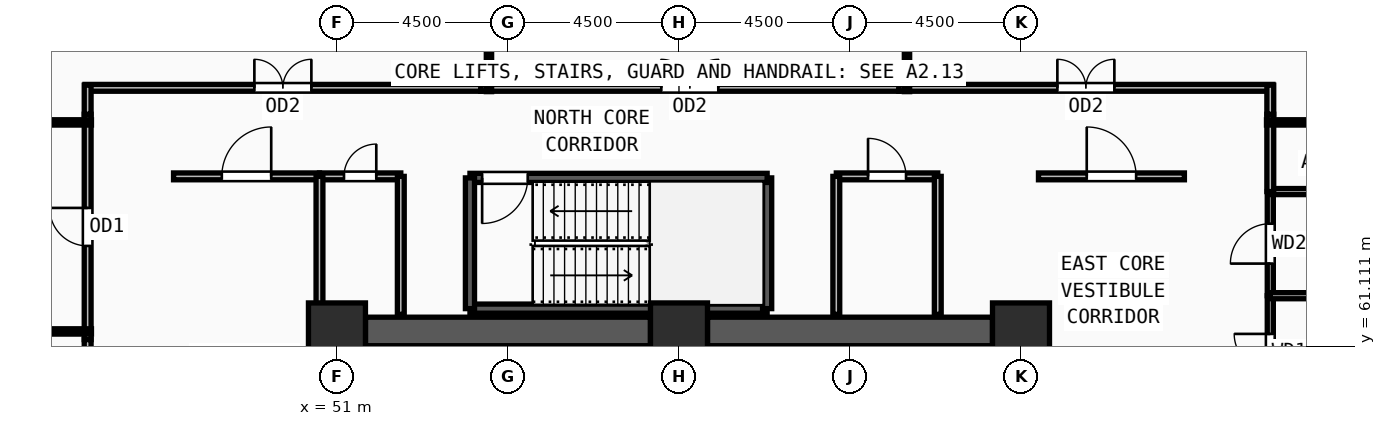
"""IFC4 building model, lengths in metres.
Left out: names, types, materials, properties, quantities, classifications, styles, units other than length and angle.
Written with IfcOpenShell. Run it as: python <this file> out.ifc"""

import sys

from ifc_helpers import new_model, si_unit, direction, frame, frame_2d, origin, origin_2d, place, context, subcontext, project, spatial, rectangle, extrude, source, transform, mapped, element, fill, save


model = new_model("IFC4")
c1 = context("Model", 3, precision=1e-05, world=origin(), true_north=direction((0.0, 1.0)))
c2 = subcontext(c1, "Body", "Model", "MODEL_VIEW")
j1 = project(units=[si_unit("LENGTHUNIT", "METRE"), si_unit("PLANEANGLEUNIT", "RADIAN")], contexts=[c1])
p1 = place(None, origin())
s1 = spatial("IfcSite", under=j1, at=p1, CompositionType="ELEMENT")
p2 = place(p1, origin())
s2 = spatial("IfcBuilding", under=s1, at=p2, CompositionType="ELEMENT")
p3 = place(p2, frame((0.0, 0.0, 102.0)))
s3 = spatial("IfcBuildingStorey", under=s2, at=p3, CompositionType="ELEMENT", Elevation=102.0)
m1 = source(origin(), c2, "Body", "SweptSolid", [
    extrude(rectangle(XDim=1.5, YDim=1.5, at=origin_2d()), origin(), (0.0, 0.0, 1.0), 3.75),
])
for number, where, z_axis, x_axis in (
    (1, (69.0, 61.5, 0.0), (0.0, 0.0, 1.0), (1.0, 0.0, 0.0)),
    (2, (60.0, 61.5, 0.0), (0.0, 0.0, 1.0), (1.0, 0.0, 0.0)),
    (3, (51.0, 61.5, 0.0), (0.0, 0.0, 1.0), (1.0, 0.0, 0.0)),
):
    element("IfcColumn", number, at=place(p3, frame(where, z_axis=z_axis, x_axis=x_axis)), inside=s3, PredefinedType="COLUMN", context=c2, shape_type="MappedRepresentation", body=[
        mapped(m1, transform((0.0, 0.0, 0.0), x_axis=(1.0, 0.0, 0.0), y_axis=(0.0, 1.0, 0.0), z_axis=(0.0, 0.0, 1.0), scale=1.0)),
    ])
for number, where, z_axis, x_axis in (
    (4, (51.75, 61.5, 0.0), (0.0, 0.0, 1.0), (1.0, 0.0, 0.0)),
    (5, (60.75, 61.5, 0.0), (0.0, 0.0, 1.0), (1.0, 0.0, 0.0)),
):
    element("IfcWall", number, at=place(p3, frame(where, z_axis=z_axis, x_axis=x_axis)), inside=s3, PredefinedType="SHEAR", context=c2, shape_type="SweptSolid", body=[
        extrude(rectangle(XDim=7.5, YDim=0.75, at=frame_2d((3.75, 0.0))), origin(), (0.0, 0.0, 1.0), 3.57),
    ])
p4 = place(p3, frame((54.5, 62.1, 0.0), z_axis=(0.0, 0.0, 1.0), x_axis=(1.0, 0.0, 0.0)))
e6 = element("IfcWall", 6, at=p4, inside=s3, PredefinedType="SOLIDWALL", context=c2, shape_type="SweptSolid", body=[
    extrude(rectangle(XDim=7.82, YDim=0.24, at=frame_2d((3.91, 0.0))), origin(), (0.0, 0.0, 1.0), 3.57),
])
p5 = place(p3, frame((62.32, 62.1, 0.0), z_axis=(0.0, 0.0, 1.0), x_axis=(0.0, 1.0, 0.0)))
e7 = element("IfcWall", 7, at=p5, inside=s3, PredefinedType="SOLIDWALL", context=c2, shape_type="SweptSolid", body=[
    extrude(rectangle(XDim=3.44, YDim=0.24, at=frame_2d((1.72, 0.0))), origin(), (0.0, 0.0, 1.0), 3.57),
])
p6 = place(p3, frame((62.32, 65.54, 0.0), z_axis=(0.0, 0.0, 1.0), x_axis=(-1.0, 0.0, 0.0)))
e8 = element("IfcWall", 8, at=p6, inside=s3, PredefinedType="SOLIDWALL", context=c2, shape_type="SweptSolid", body=[
    extrude(rectangle(XDim=7.82, YDim=0.24, at=frame_2d((3.91, 0.0))), origin(), (0.0, 0.0, 1.0), 3.57),
])
m2 = source(origin(), c2, "Body", "SweptSolid", [
    extrude(rectangle(XDim=1.2, YDim=2.2, at=frame_2d((0.6, 1.1))), frame((0.0, 0.13, 0.0), z_axis=(0.0, -1.0, 0.0), x_axis=(1.0, 0.0, 0.0)), (0.0, 0.0, 1.0), 0.26),
])
p7 = place(p6, frame((6.3, 0.0, 0.0)))
e9 = element("IfcOpeningElement", 9, at=p7, cuts=e8, PredefinedType="OPENING", context=c2, shape_type="MappedRepresentation", body=[
    mapped(m2, transform((0.0, 0.0, 0.0), x_axis=(1.0, 0.0, 0.0), y_axis=(0.0, 1.0, 0.0), z_axis=(0.0, 0.0, 1.0), scale=1.0)),
])
p8 = place(p3, frame((54.5, 65.54, 0.0), z_axis=(0.0, 0.0, 1.0), x_axis=(0.0, -1.0, 0.0)))
e10 = element("IfcWall", 10, at=p8, inside=s3, PredefinedType="SOLIDWALL", context=c2, shape_type="SweptSolid", body=[
    extrude(rectangle(XDim=3.44, YDim=0.24, at=frame_2d((1.72, 0.0))), origin(), (0.0, 0.0, 1.0), 3.57),
])
p9 = place(p3, frame((75.56, 59.48, 0.0), z_axis=(0.0, 0.0, 1.0), x_axis=(0.0, 1.0, 0.0)))
e11 = element("IfcWall", 11, at=p9, inside=s3, PredefinedType="PARTITIONING", context=c2, shape_type="SweptSolid", body=[
    extrude(rectangle(XDim=2.96, YDim=0.16, at=frame_2d((1.48, 0.0))), origin(), (0.0, 0.0, 1.0), 3.57),
])
m3 = source(origin(), c2, "Body", "SweptSolid", [
    extrude(rectangle(XDim=0.95, YDim=2.15, at=frame_2d((0.475, 1.075))), frame((0.0, 0.09, 0.0), z_axis=(0.0, -1.0, 0.0), x_axis=(1.0, 0.0, 0.0)), (0.0, 0.0, 1.0), 0.18),
])
p10 = place(p9, frame((1.005, 0.0, 0.0)))
e12 = element("IfcOpeningElement", 12, at=p10, cuts=e11, PredefinedType="OPENING", context=c2, shape_type="MappedRepresentation", body=[
    mapped(m3, transform((0.0, 0.0, 0.0), x_axis=(1.0, 0.0, 0.0), y_axis=(0.0, 1.0, 0.0), z_axis=(0.0, 0.0, 1.0), scale=1.0)),
])
p11 = place(p3, frame((75.56, 62.44, 0.0), z_axis=(0.0, 0.0, 1.0), x_axis=(0.0, 1.0, 0.0)))
e13 = element("IfcWall", 13, at=p11, inside=s3, PredefinedType="PARTITIONING", context=c2, shape_type="SweptSolid", body=[
    extrude(rectangle(XDim=2.74, YDim=0.16, at=frame_2d((1.37, 0.0))), origin(), (0.0, 0.0, 1.0), 3.57),
])
m4 = source(origin(), c2, "Body", "SweptSolid", [
    extrude(rectangle(XDim=1.05, YDim=2.15, at=frame_2d((0.525, 1.075))), frame((0.0, 0.09, 0.0), z_axis=(0.0, -1.0, 0.0), x_axis=(1.0, 0.0, 0.0)), (0.0, 0.0, 1.0), 0.18),
])
p12 = place(p11, frame((0.845, 0.0, 0.0)))
e14 = element("IfcOpeningElement", 14, at=p12, cuts=e13, PredefinedType="OPENING", context=c2, shape_type="MappedRepresentation", body=[
    mapped(m4, transform((0.0, 0.0, 0.0), x_axis=(1.0, 0.0, 0.0), y_axis=(0.0, 1.0, 0.0), z_axis=(0.0, 0.0, 1.0), scale=1.0)),
])
p13 = place(p3, frame((50.54, 65.58, 0.0), z_axis=(0.0, 0.0, 1.0), x_axis=(1.0, 0.0, 0.0)))
e15 = element("IfcWall", 15, at=p13, inside=s3, PredefinedType="PARTITIONING", context=c2, shape_type="SweptSolid", body=[
    extrude(rectangle(XDim=2.14, YDim=0.18, at=frame_2d((1.07, 0.0))), origin(), (0.0, 0.0, 1.0), 3.57),
])
m5 = source(origin(), c2, "Body", "SweptSolid", [
    extrude(rectangle(XDim=0.85, YDim=2.1, at=frame_2d((0.425, 1.05))), frame((0.0, 0.1, 0.0), z_axis=(0.0, -1.0, 0.0), x_axis=(1.0, 0.0, 0.0)), (0.0, 0.0, 1.0), 0.2),
])
p14 = place(p13, frame((0.645, 0.0, 0.0)))
e16 = element("IfcOpeningElement", 16, at=p14, cuts=e15, PredefinedType="OPENING", context=c2, shape_type="MappedRepresentation", body=[
    mapped(m5, transform((0.0, 0.0, 0.0), x_axis=(1.0, 0.0, 0.0), y_axis=(0.0, 1.0, 0.0), z_axis=(0.0, 0.0, 1.0), scale=1.0)),
])
p15 = place(p3, frame((64.14, 65.58, 0.0), z_axis=(0.0, 0.0, 1.0), x_axis=(1.0, 0.0, 0.0)))
e17 = element("IfcWall", 17, at=p15, inside=s3, PredefinedType="PARTITIONING", context=c2, shape_type="SweptSolid", body=[
    extrude(rectangle(XDim=2.67, YDim=0.18, at=frame_2d((1.335, 0.0))), origin(), (0.0, 0.0, 1.0), 3.57),
])
m6 = source(origin(), c2, "Body", "SweptSolid", [
    extrude(rectangle(XDim=1.0, YDim=2.2, at=frame_2d((0.5, 1.1))), frame((0.0, 0.1, 0.0), z_axis=(0.0, -1.0, 0.0), x_axis=(1.0, 0.0, 0.0)), (0.0, 0.0, 1.0), 0.2),
])
p16 = place(p15, frame((0.835, 0.0, 0.0)))
e18 = element("IfcOpeningElement", 18, at=p16, cuts=e17, PredefinedType="OPENING", context=c2, shape_type="MappedRepresentation", body=[
    mapped(m6, transform((0.0, 0.0, 0.0), x_axis=(1.0, 0.0, 0.0), y_axis=(0.0, 1.0, 0.0), z_axis=(0.0, 0.0, 1.0), scale=1.0)),
])
p17 = place(p3, frame((46.7, 65.58, 0.0), z_axis=(0.0, 0.0, 1.0), x_axis=(1.0, 0.0, 0.0)))
e19 = element("IfcWall", 19, at=p17, inside=s3, PredefinedType="PARTITIONING", context=c2, shape_type="SweptSolid", body=[
    extrude(rectangle(XDim=3.84, YDim=0.18, at=frame_2d((1.92, 0.0))), origin(), (0.0, 0.0, 1.0), 3.57),
])
m7 = source(origin(), c2, "Body", "SweptSolid", [
    extrude(rectangle(XDim=1.3, YDim=2.2, at=frame_2d((0.65, 1.1))), frame((0.0, 0.1, 0.0), z_axis=(0.0, -1.0, 0.0), x_axis=(1.0, 0.0, 0.0)), (0.0, 0.0, 1.0), 0.2),
])
p18 = place(p17, frame((1.27, 0.0, 0.0)))
e20 = element("IfcOpeningElement", 20, at=p18, cuts=e19, PredefinedType="OPENING", context=c2, shape_type="MappedRepresentation", body=[
    mapped(m7, transform((0.0, 0.0, 0.0), x_axis=(1.0, 0.0, 0.0), y_axis=(0.0, 1.0, 0.0), z_axis=(0.0, 0.0, 1.0), scale=1.0)),
])
p19 = place(p3, frame((69.46, 65.58, 0.0), z_axis=(0.0, 0.0, 1.0), x_axis=(1.0, 0.0, 0.0)))
e21 = element("IfcWall", 21, at=p19, inside=s3, PredefinedType="PARTITIONING", context=c2, shape_type="SweptSolid", body=[
    extrude(rectangle(XDim=3.84, YDim=0.18, at=frame_2d((1.92, 0.0))), origin(), (0.0, 0.0, 1.0), 3.57),
])
p20 = place(p19, frame((1.27, 0.0, 0.0)))
e22 = element("IfcOpeningElement", 22, at=p20, cuts=e21, PredefinedType="OPENING", context=c2, shape_type="MappedRepresentation", body=[
    mapped(m7, transform((0.0, 0.0, 0.0), x_axis=(1.0, 0.0, 0.0), y_axis=(0.0, 1.0, 0.0), z_axis=(0.0, 0.0, 1.0), scale=1.0)),
])
p21 = place(p3, frame((65.785, 67.91, 0.0), z_axis=(0.0, 0.0, 1.0), x_axis=(1.0, 0.0, 0.0)))
e23 = element("IfcWall", 23, at=p21, inside=s3, PredefinedType="PARTITIONING", context=c2, shape_type="SweptSolid", body=[
    extrude(rectangle(XDim=9.845, YDim=0.18, at=frame_2d((4.922, 0.0))), origin(), (0.0, 0.0, 1.0), 3.57),
])
m8 = source(origin(), c2, "Body", "SweptSolid", [
    extrude(rectangle(XDim=1.5, YDim=2.2, at=frame_2d((0.75, 1.1))), frame((0.0, 0.1, 0.0), z_axis=(0.0, -1.0, 0.0), x_axis=(1.0, 0.0, 0.0)), (0.0, 0.0, 1.0), 0.2),
])
p22 = place(p21, frame((4.172, 0.0, 0.0)))
e24 = element("IfcOpeningElement", 24, at=p22, cuts=e23, PredefinedType="OPENING", context=c2, shape_type="MappedRepresentation", body=[
    mapped(m8, transform((0.0, 0.0, 0.0), x_axis=(1.0, 0.0, 0.0), y_axis=(0.0, 1.0, 0.0), z_axis=(0.0, 0.0, 1.0), scale=1.0)),
])
p23 = place(p3, frame((54.785, 67.91, 0.0), z_axis=(0.0, 0.0, 1.0), x_axis=(1.0, 0.0, 0.0)))
e25 = element("IfcWall", 25, at=p23, inside=s3, PredefinedType="PARTITIONING", context=c2, shape_type="SweptSolid", body=[
    extrude(rectangle(XDim=11.0, YDim=0.18, at=frame_2d((5.5, 0.0))), origin(), (0.0, 0.0, 1.0), 3.57),
])
p24 = place(p23, frame((4.75, 0.0, 0.0)))
e26 = element("IfcOpeningElement", 26, at=p24, cuts=e25, PredefinedType="OPENING", context=c2, shape_type="MappedRepresentation", body=[
    mapped(m8, transform((0.0, 0.0, 0.0), x_axis=(1.0, 0.0, 0.0), y_axis=(0.0, 1.0, 0.0), z_axis=(0.0, 0.0, 1.0), scale=1.0)),
])
p25 = place(p3, frame((44.37, 67.91, 0.0), z_axis=(0.0, 0.0, 1.0), x_axis=(1.0, 0.0, 0.0)))
e27 = element("IfcWall", 27, at=p25, inside=s3, PredefinedType="PARTITIONING", context=c2, shape_type="SweptSolid", body=[
    extrude(rectangle(XDim=10.415, YDim=0.18, at=frame_2d((5.208, 0.0))), origin(), (0.0, 0.0, 1.0), 3.57),
])
p26 = place(p25, frame((4.457, 0.0, 0.0)))
e28 = element("IfcOpeningElement", 28, at=p26, cuts=e27, PredefinedType="OPENING", context=c2, shape_type="MappedRepresentation", body=[
    mapped(m8, transform((0.0, 0.0, 0.0), x_axis=(1.0, 0.0, 0.0), y_axis=(0.0, 1.0, 0.0), z_axis=(0.0, 0.0, 1.0), scale=1.0)),
])
p27 = place(p3, frame((44.44, 61.285, 0.0), z_axis=(0.0, 0.0, 1.0), x_axis=(0.0, 1.0, 0.0)))
e29 = element("IfcWall", 29, at=p27, inside=s3, PredefinedType="PARTITIONING", context=c2, shape_type="SweptSolid", body=[
    extrude(rectangle(XDim=5.93, YDim=0.18, at=frame_2d((2.965, 0.0))), origin(), (0.0, 0.0, 1.0), 3.57),
])
p28 = place(p27, frame((2.465, 0.0, 0.0)))
e30 = element("IfcOpeningElement", 30, at=p28, cuts=e29, PredefinedType="OPENING", context=c2, shape_type="MappedRepresentation", body=[
    mapped(m6, transform((0.0, 0.0, 0.0), x_axis=(1.0, 0.0, 0.0), y_axis=(0.0, 1.0, 0.0), z_axis=(0.0, 0.0, 1.0), scale=1.0)),
])
for number, where, z_axis, x_axis in (
    (31, (75.56, 62.44, 0.0), (0.0, 0.0, 1.0), (1.0, 0.0, 0.0)),
    (32, (75.56, 65.18, 0.0), (0.0, 0.0, 1.0), (1.0, 0.0, 0.0)),
):
    element("IfcWall", number, at=place(p3, frame(where, z_axis=z_axis, x_axis=x_axis)), inside=s3, PredefinedType="PARTITIONING", context=c2, shape_type="SweptSolid", body=[
        extrude(rectangle(XDim=4.46, YDim=0.16, at=frame_2d((2.23, 0.0))), origin(), (0.0, 0.0, 1.0), 3.57),
    ])
for number, where, z_axis, x_axis in (
    (33, (50.54, 61.95, 0.0), (0.0, 0.0, 1.0), (0.0, 1.0, 0.0)),
    (34, (52.68, 61.95, 0.0), (0.0, 0.0, 1.0), (0.0, 1.0, 0.0)),
    (35, (64.14, 61.95, 0.0), (0.0, 0.0, 1.0), (0.0, 1.0, 0.0)),
    (36, (66.81, 61.95, 0.0), (0.0, 0.0, 1.0), (0.0, 1.0, 0.0)),
):
    element("IfcWall", number, at=place(p3, frame(where, z_axis=z_axis, x_axis=x_axis)), inside=s3, PredefinedType="PARTITIONING", context=c2, shape_type="SweptSolid", body=[
        extrude(rectangle(XDim=3.63, YDim=0.18, at=frame_2d((1.815, 0.0))), origin(), (0.0, 0.0, 1.0), 3.57),
    ])
p29 = place(p3, frame((75.56, 67.215, 0.0), z_axis=(0.0, 0.0, 1.0), x_axis=(0.0, -1.0, 0.0)))
e37 = element("IfcWall", 37, at=p29, inside=s3, PredefinedType="PARTITIONING", context=c2, shape_type="SweptSolid", body=[
    extrude(rectangle(XDim=2.035, YDim=0.18, at=frame_2d((1.018, 0.0))), origin(), (0.0, 0.0, 1.0), 3.57),
])
for number, where, z_axis, x_axis in (
    (38, (75.56, 67.98, 0.0), (0.0, 0.0, 1.0), (0.0, -1.0, 0.0)),
    (39, (44.44, 67.215, 0.0), (0.0, 0.0, 1.0), (0.0, 1.0, 0.0)),
):
    element("IfcWall", number, at=place(p3, frame(where, z_axis=z_axis, x_axis=x_axis)), inside=s3, PredefinedType="PARTITIONING", context=c2, shape_type="SweptSolid", body=[
        extrude(rectangle(XDim=0.765, YDim=0.18, at=frame_2d((0.382, 0.0))), origin(), (0.0, 0.0, 1.0), 3.57),
    ])
p30 = place(p3, frame((44.44, 56.19, 0.0), z_axis=(0.0, 0.0, 1.0), x_axis=(0.0, 1.0, 0.0)))
e40 = element("IfcWall", 40, at=p30, inside=s3, PredefinedType="PARTITIONING", context=c2, shape_type="SweptSolid", body=[
    extrude(rectangle(XDim=5.095, YDim=0.18, at=frame_2d((2.547, 0.0))), origin(), (0.0, 0.0, 1.0), 3.57),
])
p31 = place(p3, frame((44.54, 61.5, 0.0), z_axis=(0.0, 0.0, 1.0), x_axis=(-1.0, 0.0, 0.0)))
e41 = element("IfcWall", 41, at=p31, inside=s3, PredefinedType="PARTITIONING", context=c2, shape_type="SweptSolid", body=[
    extrude(rectangle(XDim=18.665, YDim=0.14, at=frame_2d((9.333, 0.0))), origin(), (0.0, 0.0, 1.0), 3.57),
])
p32 = place(p3, frame((44.54, 67.0, 0.0), z_axis=(0.0, 0.0, 1.0), x_axis=(-1.0, 0.0, 0.0)))
e42 = element("IfcWall", 42, at=p32, inside=s3, PredefinedType="PARTITIONING", context=c2, shape_type="SweptSolid", body=[
    extrude(rectangle(XDim=21.431, YDim=0.14, at=frame_2d((10.716, 0.0))), origin(), (0.0, 0.0, 1.0), 2.755),
])
p33 = place(p3, frame((75.46, 67.0, 0.0), z_axis=(0.0, 0.0, 1.0), x_axis=(1.0, 0.0, 0.0)))
e43 = element("IfcWall", 43, at=p33, inside=s3, PredefinedType="PARTITIONING", context=c2, shape_type="SweptSolid", body=[
    extrude(rectangle(XDim=21.453, YDim=0.14, at=frame_2d((10.727, 0.0))), origin(), (0.0, 0.0, 1.0), 2.755),
])
p34 = place(p3, frame((55.0, 67.81, 0.0), z_axis=(0.0, 0.0, 1.0), x_axis=(0.0, 1.0, 0.0)))
e44 = element("IfcWall", 44, at=p34, inside=s3, PredefinedType="PARTITIONING", context=c2, shape_type="SweptSolid", body=[
    extrude(rectangle(XDim=13.368, YDim=0.14, at=frame_2d((6.684, 0.0))), origin(), (0.0, 0.0, 1.0), 3.57),
])
p35 = place(p3, frame((66.0, 67.81, 0.0), z_axis=(0.0, 0.0, 1.0), x_axis=(0.0, 1.0, 0.0)))
e45 = element("IfcWall", 45, at=p35, inside=s3, PredefinedType="PARTITIONING", context=c2, shape_type="SweptSolid", body=[
    extrude(rectangle(XDim=13.008, YDim=0.14, at=frame_2d((6.504, 0.0))), origin(), (0.0, 0.0, 1.0), 3.57),
])
m9 = source(origin(), c2, "Body", "SweptSolid", [
    extrude(rectangle(XDim=1.2, YDim=2.2, at=frame_2d((0.6, 1.1))), frame((0.0, 0.025, 0.0), z_axis=(0.0, -1.0, 0.0), x_axis=(1.0, 0.0, 0.0)), (0.0, 0.0, 1.0), 0.05),
])
p36 = place(p7, origin())
e46 = element("IfcDoor", 46, at=p36, inside=s3, OperationType="SINGLE_SWING_RIGHT", PredefinedType="DOOR", context=c2, shape_type="MappedRepresentation", body=[
    mapped(m9, transform((0.0, 0.0, 0.0), x_axis=(1.0, 0.0, 0.0), y_axis=(0.0, 1.0, 0.0), z_axis=(0.0, 0.0, 1.0), scale=1.0)),
])
fill(e9, e46)
m10 = source(origin(), c2, "Body", "SweptSolid", [
    extrude(rectangle(XDim=0.95, YDim=2.15, at=frame_2d((0.475, 1.075))), frame((0.0, 0.025, 0.0), z_axis=(0.0, -1.0, 0.0), x_axis=(1.0, 0.0, 0.0)), (0.0, 0.0, 1.0), 0.05),
])
p37 = place(p10, origin())
e47 = element("IfcDoor", 47, at=p37, inside=s3, OperationType="SINGLE_SWING_RIGHT", PredefinedType="DOOR", context=c2, shape_type="MappedRepresentation", body=[
    mapped(m10, transform((0.0, 0.0, 0.0), x_axis=(1.0, 0.0, 0.0), y_axis=(0.0, 1.0, 0.0), z_axis=(0.0, 0.0, 1.0), scale=1.0)),
])
fill(e12, e47)
m11 = source(origin(), c2, "Body", "SweptSolid", [
    extrude(rectangle(XDim=1.05, YDim=2.15, at=frame_2d((0.525, 1.075))), frame((0.0, 0.025, 0.0), z_axis=(0.0, -1.0, 0.0), x_axis=(1.0, 0.0, 0.0)), (0.0, 0.0, 1.0), 0.05),
])
p38 = place(p12, origin())
e48 = element("IfcDoor", 48, at=p38, inside=s3, OperationType="SINGLE_SWING_LEFT", PredefinedType="DOOR", context=c2, shape_type="MappedRepresentation", body=[
    mapped(m11, transform((0.0, 0.0, 0.0), x_axis=(1.0, 0.0, 0.0), y_axis=(0.0, 1.0, 0.0), z_axis=(0.0, 0.0, 1.0), scale=1.0)),
])
fill(e14, e48)
m12 = source(origin(), c2, "Body", "SweptSolid", [
    extrude(rectangle(XDim=0.85, YDim=2.1, at=frame_2d((0.425, 1.05))), frame((0.0, 0.025, 0.0), z_axis=(0.0, -1.0, 0.0), x_axis=(1.0, 0.0, 0.0)), (0.0, 0.0, 1.0), 0.05),
])
p39 = place(p14, origin())
e49 = element("IfcDoor", 49, at=p39, inside=s3, OperationType="SINGLE_SWING_RIGHT", PredefinedType="DOOR", context=c2, shape_type="MappedRepresentation", body=[
    mapped(m12, transform((0.0, 0.0, 0.0), x_axis=(1.0, 0.0, 0.0), y_axis=(0.0, 1.0, 0.0), z_axis=(0.0, 0.0, 1.0), scale=1.0)),
])
fill(e16, e49)
m13 = source(origin(), c2, "Body", "SweptSolid", [
    extrude(rectangle(XDim=1.0, YDim=2.2, at=frame_2d((0.5, 1.1))), frame((0.0, 0.025, 0.0), z_axis=(0.0, -1.0, 0.0), x_axis=(1.0, 0.0, 0.0)), (0.0, 0.0, 1.0), 0.05),
])
p40 = place(p16, origin())
e50 = element("IfcDoor", 50, at=p40, inside=s3, OperationType="SINGLE_SWING_LEFT", PredefinedType="DOOR", context=c2, shape_type="MappedRepresentation", body=[
    mapped(m13, transform((0.0, 0.0, 0.0), x_axis=(1.0, 0.0, 0.0), y_axis=(0.0, 1.0, 0.0), z_axis=(0.0, 0.0, 1.0), scale=1.0)),
])
fill(e18, e50)
m14 = source(origin(), c2, "Body", "SweptSolid", [
    extrude(rectangle(XDim=1.3, YDim=2.2, at=frame_2d((0.65, 1.1))), frame((0.0, 0.025, 0.0), z_axis=(0.0, -1.0, 0.0), x_axis=(1.0, 0.0, 0.0)), (0.0, 0.0, 1.0), 0.05),
])
p41 = place(p18, origin())
e51 = element("IfcDoor", 51, at=p41, inside=s3, OperationType="SINGLE_SWING_RIGHT", PredefinedType="DOOR", context=c2, shape_type="MappedRepresentation", body=[
    mapped(m14, transform((0.0, 0.0, 0.0), x_axis=(1.0, 0.0, 0.0), y_axis=(0.0, 1.0, 0.0), z_axis=(0.0, 0.0, 1.0), scale=1.0)),
])
fill(e20, e51)
p42 = place(p20, origin())
e52 = element("IfcDoor", 52, at=p42, inside=s3, OperationType="SINGLE_SWING_LEFT", PredefinedType="DOOR", context=c2, shape_type="MappedRepresentation", body=[
    mapped(m14, transform((0.0, 0.0, 0.0), x_axis=(1.0, 0.0, 0.0), y_axis=(0.0, 1.0, 0.0), z_axis=(0.0, 0.0, 1.0), scale=1.0)),
])
fill(e22, e52)
m15 = source(origin(), c2, "Body", "SweptSolid", [
    extrude(rectangle(XDim=1.5, YDim=2.2, at=frame_2d((0.75, 1.1))), frame((0.0, 0.025, 0.0), z_axis=(0.0, -1.0, 0.0), x_axis=(1.0, 0.0, 0.0)), (0.0, 0.0, 1.0), 0.05),
])
p43 = place(p22, origin())
e53 = element("IfcDoor", 53, at=p43, inside=s3, OperationType="DOUBLE_DOOR_SINGLE_SWING", PredefinedType="DOOR", context=c2, shape_type="MappedRepresentation", body=[
    mapped(m15, transform((0.0, 0.0, 0.0), x_axis=(1.0, 0.0, 0.0), y_axis=(0.0, 1.0, 0.0), z_axis=(0.0, 0.0, 1.0), scale=1.0)),
])
fill(e24, e53)
p44 = place(p24, origin())
e54 = element("IfcDoor", 54, at=p44, inside=s3, OperationType="DOUBLE_DOOR_SINGLE_SWING", PredefinedType="DOOR", context=c2, shape_type="MappedRepresentation", body=[
    mapped(m15, transform((0.0, 0.0, 0.0), x_axis=(1.0, 0.0, 0.0), y_axis=(0.0, 1.0, 0.0), z_axis=(0.0, 0.0, 1.0), scale=1.0)),
])
fill(e26, e54)
p45 = place(p26, origin())
e55 = element("IfcDoor", 55, at=p45, inside=s3, OperationType="DOUBLE_DOOR_SINGLE_SWING", PredefinedType="DOOR", context=c2, shape_type="MappedRepresentation", body=[
    mapped(m15, transform((0.0, 0.0, 0.0), x_axis=(1.0, 0.0, 0.0), y_axis=(0.0, 1.0, 0.0), z_axis=(0.0, 0.0, 1.0), scale=1.0)),
])
fill(e28, e55)
p46 = place(p28, origin())
e56 = element("IfcDoor", 56, at=p46, inside=s3, OperationType="SINGLE_SWING_RIGHT", PredefinedType="DOOR", context=c2, shape_type="MappedRepresentation", body=[
    mapped(m13, transform((0.0, 0.0, 0.0), x_axis=(1.0, 0.0, 0.0), y_axis=(0.0, 1.0, 0.0), z_axis=(0.0, 0.0, 1.0), scale=1.0)),
])
fill(e30, e56)
save(model, sys.argv[1])
